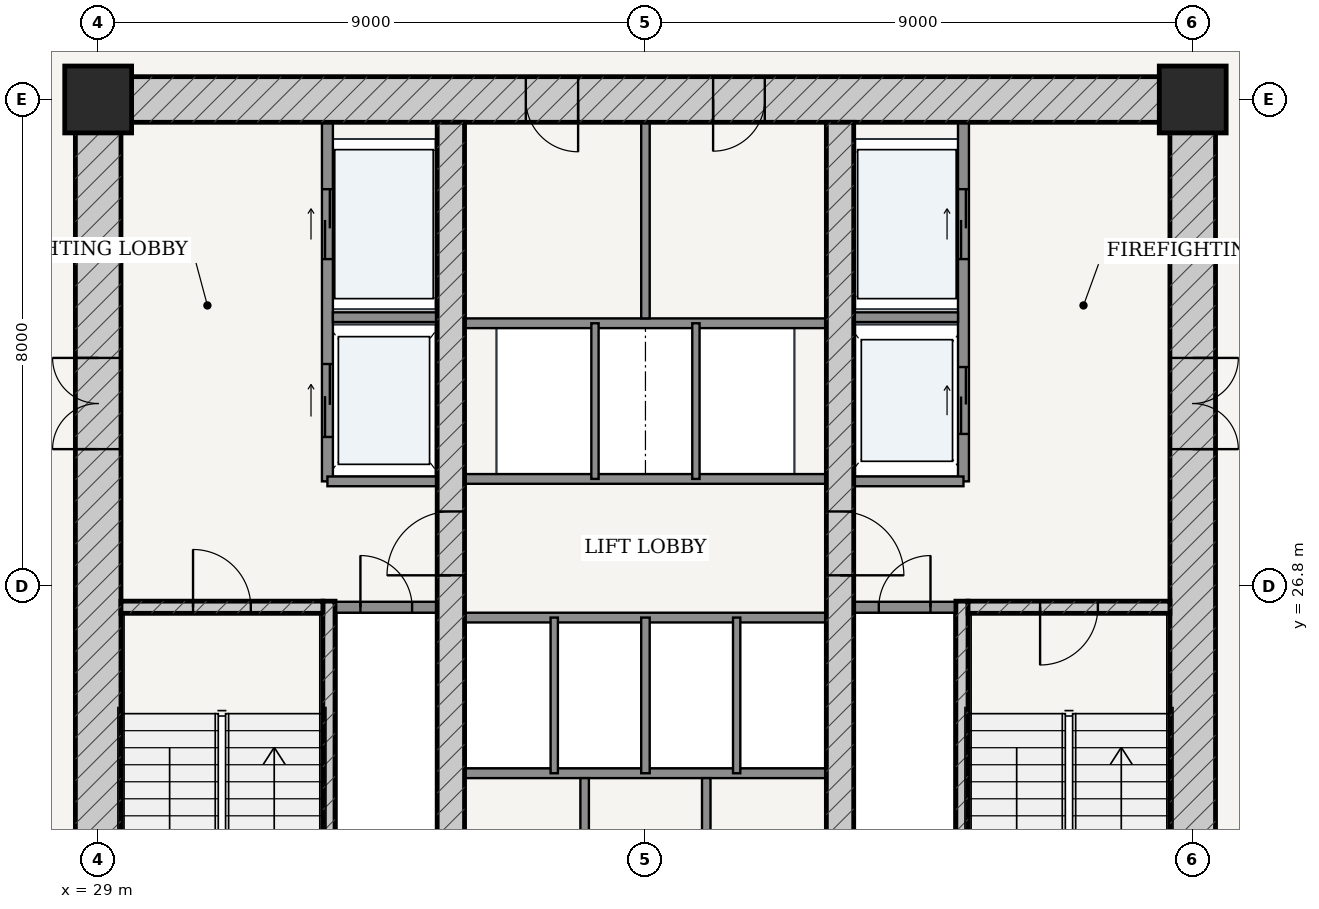
"""IFC4 building model, lengths in metres.
Left out: names, types, materials, properties, quantities, classifications, styles, units other than length and angle.
Written with IfcOpenShell. Run it as: python <this file> out.ifc"""

import sys

from ifc_helpers import new_model, si_unit, direction, frame, frame_2d, origin, origin_2d, place, context, subcontext, project, spatial, rectangle, extrude, source, transform, mapped, element, fill, save


model = new_model("IFC4")
c1 = context("Model", 3, precision=1e-05, world=origin(), true_north=direction((-0.2419218956, 0.970295726276)))
c2 = subcontext(c1, "Body", "Model", "MODEL_VIEW")
j1 = project(units=[si_unit("LENGTHUNIT", "METRE"), si_unit("PLANEANGLEUNIT", "RADIAN")], contexts=[c1])
p1 = place(None, origin())
s1 = spatial("IfcSite", under=j1, at=p1, CompositionType="ELEMENT")
p2 = place(p1, origin())
s2 = spatial("IfcBuilding", under=s1, at=p2, CompositionType="ELEMENT")
p3 = place(p2, frame((0.0, 0.0, -4.2)))
s3 = spatial("IfcBuildingStorey", under=s2, at=p3, CompositionType="ELEMENT", Elevation=-4.2)
for number, where, z_axis, x_axis in (
    (1, (47.0, 34.8, 0.0), (0.0, 0.0, 1.0), (1.0, 0.0, 0.0)),
    (2, (29.0, 34.8, 0.0), (0.0, 0.0, 1.0), (1.0, 0.0, 0.0)),
):
    element("IfcColumn", number, at=place(p3, frame(where, z_axis=z_axis, x_axis=x_axis)), inside=s3, PredefinedType="COLUMN", context=c2, shape_type="SweptSolid", body=[
        extrude(rectangle(XDim=1.1, YDim=1.1, at=origin_2d()), origin(), (0.0, 0.0, 1.0), 4.2),
    ])
p4 = place(p3, frame((28.625, 34.8, 0.0), z_axis=(0.0, 0.0, 1.0), x_axis=(1.0, 0.0, 0.0)))
e3 = element("IfcWall", 3, at=p4, inside=s3, PredefinedType="SHEAR", context=c2, shape_type="SweptSolid", body=[
    extrude(rectangle(XDim=18.75, YDim=0.75, at=frame_2d((9.375, 0.0))), origin(), (0.0, 0.0, 1.0), 3.78),
])
p5 = place(p4, frame((7.407, 0.0, 0.0)))
e4 = element("IfcOpeningElement", 4, at=p5, cuts=e3, PredefinedType="OPENING", context=c2, shape_type="SweptSolid", body=[
    extrude(rectangle(XDim=0.86, YDim=2.1, at=frame_2d((0.43, 1.05))), frame((0.0, 0.385, 0.0), z_axis=(0.0, -1.0, 0.0), x_axis=(1.0, 0.0, 0.0)), (0.0, 0.0, 1.0), 0.77),
])
p6 = place(p4, frame((10.488, 0.0, 0.0)))
e5 = element("IfcOpeningElement", 5, at=p6, cuts=e3, PredefinedType="OPENING", context=c2, shape_type="SweptSolid", body=[
    extrude(rectangle(XDim=0.85, YDim=2.1, at=frame_2d((0.425, 1.05))), frame((0.0, 0.385, 0.0), z_axis=(0.0, -1.0, 0.0), x_axis=(1.0, 0.0, 0.0)), (0.0, 0.0, 1.0), 0.77),
])
p7 = place(p3, frame((29.0, 19.175, 0.0), z_axis=(0.0, 0.0, 1.0), x_axis=(0.0, 1.0, 0.0)))
e6 = element("IfcWall", 6, at=p7, inside=s3, PredefinedType="SHEAR", context=c2, shape_type="SweptSolid", body=[
    extrude(rectangle(XDim=15.25, YDim=0.75, at=frame_2d((7.625, 0.0))), origin(), (0.0, 0.0, 1.0), 3.78),
])
p8 = place(p7, frame((9.875, 0.0, 0.0)))
e7 = element("IfcOpeningElement", 7, at=p8, cuts=e6, PredefinedType="OPENING", context=c2, shape_type="SweptSolid", body=[
    extrude(rectangle(XDim=1.5, YDim=2.2, at=frame_2d((0.75, 1.1))), frame((0.0, 0.385, 0.0), z_axis=(0.0, -1.0, 0.0), x_axis=(1.0, 0.0, 0.0)), (0.0, 0.0, 1.0), 0.77),
])
p9 = place(p3, frame((47.0, 19.175, 0.0), z_axis=(0.0, 0.0, 1.0), x_axis=(0.0, 1.0, 0.0)))
e8 = element("IfcWall", 8, at=p9, inside=s3, PredefinedType="SHEAR", context=c2, shape_type="SweptSolid", body=[
    extrude(rectangle(XDim=15.25, YDim=0.75, at=frame_2d((7.625, 0.0))), origin(), (0.0, 0.0, 1.0), 3.78),
])
p10 = place(p9, frame((9.875, 0.0, 0.0)))
e9 = element("IfcOpeningElement", 9, at=p10, cuts=e8, PredefinedType="OPENING", context=c2, shape_type="SweptSolid", body=[
    extrude(rectangle(XDim=1.5, YDim=2.2, at=frame_2d((0.75, 1.1))), frame((0.0, 0.385, 0.0), z_axis=(0.0, -1.0, 0.0), x_axis=(1.0, 0.0, 0.0)), (0.0, 0.0, 1.0), 0.77),
])
p11 = place(p3, frame((32.795, 19.175, 0.0), z_axis=(0.0, 0.0, 1.0), x_axis=(0.0, 1.0, 0.0)))
e10 = element("IfcWall", 10, at=p11, inside=s3, PredefinedType="SOLIDWALL", context=c2, shape_type="SweptSolid", body=[
    extrude(rectangle(XDim=7.375, YDim=0.2, at=frame_2d((3.688, 0.0))), origin(), (0.0, 0.0, 1.0), 3.78),
])
p12 = place(p3, frame((29.375, 26.45, 0.0), z_axis=(0.0, 0.0, 1.0), x_axis=(1.0, 0.0, 0.0)))
e11 = element("IfcWall", 11, at=p12, inside=s3, PredefinedType="SOLIDWALL", context=c2, shape_type="SweptSolid", body=[
    extrude(rectangle(XDim=3.32, YDim=0.2, at=frame_2d((1.66, 0.0))), origin(), (0.0, 0.0, 1.0), 3.78),
])
p13 = place(p12, frame((1.185, 0.0, 0.0)))
e12 = element("IfcOpeningElement", 12, at=p13, cuts=e11, PredefinedType="OPENING", context=c2, shape_type="SweptSolid", body=[
    extrude(rectangle(XDim=0.95, YDim=2.15, at=frame_2d((0.475, 1.075))), frame((0.0, 0.11, 0.0), z_axis=(0.0, -1.0, 0.0), x_axis=(1.0, 0.0, 0.0)), (0.0, 0.0, 1.0), 0.22),
])
p14 = place(p3, frame((43.205, 19.175, 0.0), z_axis=(0.0, 0.0, 1.0), x_axis=(0.0, 1.0, 0.0)))
e13 = element("IfcWall", 13, at=p14, inside=s3, PredefinedType="SOLIDWALL", context=c2, shape_type="SweptSolid", body=[
    extrude(rectangle(XDim=7.375, YDim=0.2, at=frame_2d((3.688, 0.0))), origin(), (0.0, 0.0, 1.0), 3.78),
])
p15 = place(p3, frame((43.305, 26.45, 0.0), z_axis=(0.0, 0.0, 1.0), x_axis=(1.0, 0.0, 0.0)))
e14 = element("IfcWall", 14, at=p15, inside=s3, PredefinedType="SOLIDWALL", context=c2, shape_type="SweptSolid", body=[
    extrude(rectangle(XDim=3.32, YDim=0.2, at=frame_2d((1.66, 0.0))), origin(), (0.0, 0.0, 1.0), 3.78),
])
p16 = place(p15, frame((1.185, 0.0, 0.0)))
e15 = element("IfcOpeningElement", 15, at=p16, cuts=e14, PredefinedType="OPENING", context=c2, shape_type="SweptSolid", body=[
    extrude(rectangle(XDim=0.95, YDim=2.15, at=frame_2d((0.475, 1.075))), frame((0.0, 0.11, 0.0), z_axis=(0.0, -1.0, 0.0), x_axis=(1.0, 0.0, 0.0)), (0.0, 0.0, 1.0), 0.22),
])
p17 = place(p3, frame((34.8, 19.175, 0.0), z_axis=(0.0, 0.0, 1.0), x_axis=(0.0, 1.0, 0.0)))
e16 = element("IfcWall", 16, at=p17, inside=s3, PredefinedType="SHEAR", context=c2, shape_type="SweptSolid", body=[
    extrude(rectangle(XDim=15.25, YDim=0.45, at=frame_2d((7.625, 0.0))), origin(), (0.0, 0.0, 1.0), 3.78),
])
p18 = place(p17, frame((7.8, 0.0, 0.0)))
e17 = element("IfcOpeningElement", 17, at=p18, cuts=e16, PredefinedType="OPENING", context=c2, shape_type="SweptSolid", body=[
    extrude(rectangle(XDim=1.05, YDim=2.15, at=frame_2d((0.525, 1.075))), frame((0.0, 0.235, 0.0), z_axis=(0.0, -1.0, 0.0), x_axis=(1.0, 0.0, 0.0)), (0.0, 0.0, 1.0), 0.47),
])
p19 = place(p3, frame((41.2, 19.175, 0.0), z_axis=(0.0, 0.0, 1.0), x_axis=(0.0, 1.0, 0.0)))
e18 = element("IfcWall", 18, at=p19, inside=s3, PredefinedType="SHEAR", context=c2, shape_type="SweptSolid", body=[
    extrude(rectangle(XDim=15.25, YDim=0.45, at=frame_2d((7.625, 0.0))), origin(), (0.0, 0.0, 1.0), 3.78),
])
p20 = place(p19, frame((7.8, 0.0, 0.0)))
e19 = element("IfcOpeningElement", 19, at=p20, cuts=e18, PredefinedType="OPENING", context=c2, shape_type="SweptSolid", body=[
    extrude(rectangle(XDim=1.05, YDim=2.15, at=frame_2d((0.525, 1.075))), frame((0.0, 0.235, 0.0), z_axis=(0.0, -1.0, 0.0), x_axis=(1.0, 0.0, 0.0)), (0.0, 0.0, 1.0), 0.47),
])
p21 = place(p3, frame((32.9, 26.45, 0.0), z_axis=(0.0, 0.0, 1.0), x_axis=(1.0, 0.0, 0.0)))
e20 = element("IfcWall", 20, at=p21, inside=s3, PredefinedType="PARTITIONING", context=c2, shape_type="SweptSolid", body=[
    extrude(rectangle(XDim=1.675, YDim=0.18, at=frame_2d((0.837, 0.0))), origin(), (0.0, 0.0, 1.0), 3.78),
])
p22 = place(p21, frame((0.413, 0.0, 0.0)))
e21 = element("IfcOpeningElement", 21, at=p22, cuts=e20, PredefinedType="OPENING", context=c2, shape_type="SweptSolid", body=[
    extrude(rectangle(XDim=0.85, YDim=2.1, at=frame_2d((0.425, 1.05))), frame((0.0, 0.1, 0.0), z_axis=(0.0, -1.0, 0.0), x_axis=(1.0, 0.0, 0.0)), (0.0, 0.0, 1.0), 0.2),
])
p23 = place(p3, frame((41.425, 26.45, 0.0), z_axis=(0.0, 0.0, 1.0), x_axis=(1.0, 0.0, 0.0)))
e22 = element("IfcWall", 22, at=p23, inside=s3, PredefinedType="PARTITIONING", context=c2, shape_type="SweptSolid", body=[
    extrude(rectangle(XDim=1.675, YDim=0.18, at=frame_2d((0.837, 0.0))), origin(), (0.0, 0.0, 1.0), 3.78),
])
p24 = place(p23, frame((0.413, 0.0, 0.0)))
e23 = element("IfcOpeningElement", 23, at=p24, cuts=e22, PredefinedType="OPENING", context=c2, shape_type="SweptSolid", body=[
    extrude(rectangle(XDim=0.85, YDim=2.1, at=frame_2d((0.425, 1.05))), frame((0.0, 0.1, 0.0), z_axis=(0.0, -1.0, 0.0), x_axis=(1.0, 0.0, 0.0)), (0.0, 0.0, 1.0), 0.2),
])
p25 = place(p3, frame((32.77, 28.52, 0.0), z_axis=(0.0, 0.0, 1.0), x_axis=(0.0, 1.0, 0.0)))
e24 = element("IfcWall", 24, at=p25, inside=s3, PredefinedType="PARTITIONING", context=c2, shape_type="SweptSolid", body=[
    extrude(rectangle(XDim=5.905, YDim=0.18, at=frame_2d((2.953, 0.0))), origin(), (0.0, 0.0, 1.0), 3.78),
])
p26 = place(p25, frame((3.655, 0.0, 0.0)))
e25 = element("IfcOpeningElement", 25, at=p26, cuts=e24, PredefinedType="OPENING", context=c2, shape_type="SweptSolid", body=[
    extrude(rectangle(XDim=1.15, YDim=2.2, at=frame_2d((0.575, 1.1))), frame((0.0, 0.1, 0.0), z_axis=(0.0, -1.0, 0.0), x_axis=(1.0, 0.0, 0.0)), (0.0, 0.0, 1.0), 0.2),
])
p27 = place(p25, frame((0.73, 0.0, 0.0)))
e26 = element("IfcOpeningElement", 26, at=p27, cuts=e24, PredefinedType="OPENING", context=c2, shape_type="SweptSolid", body=[
    extrude(rectangle(XDim=1.2, YDim=2.25, at=frame_2d((0.6, 1.125))), frame((0.0, 0.1, 0.0), z_axis=(0.0, -1.0, 0.0), x_axis=(1.0, 0.0, 0.0)), (0.0, 0.0, 1.0), 0.2),
])
p28 = place(p3, frame((32.86, 31.22, 0.0), z_axis=(0.0, 0.0, 1.0), x_axis=(1.0, 0.0, 0.0)))
e27 = element("IfcWall", 27, at=p28, inside=s3, PredefinedType="PARTITIONING", context=c2, shape_type="SweptSolid", body=[
    extrude(rectangle(XDim=1.715, YDim=0.16, at=frame_2d((0.857, 0.0))), origin(), (0.0, 0.0, 1.0), 3.78),
])
p29 = place(p3, frame((32.77, 28.52, 0.0), z_axis=(0.0, 0.0, 1.0), x_axis=(1.0, 0.0, 0.0)))
e28 = element("IfcWall", 28, at=p29, inside=s3, PredefinedType="PARTITIONING", context=c2, shape_type="SweptSolid", body=[
    extrude(rectangle(XDim=1.805, YDim=0.16, at=frame_2d((0.902, 0.0))), origin(), (0.0, 0.0, 1.0), 3.78),
])
p30 = place(p3, frame((43.23, 28.52, 0.0), z_axis=(0.0, 0.0, 1.0), x_axis=(0.0, 1.0, 0.0)))
e29 = element("IfcWall", 29, at=p30, inside=s3, PredefinedType="PARTITIONING", context=c2, shape_type="SweptSolid", body=[
    extrude(rectangle(XDim=5.905, YDim=0.18, at=frame_2d((2.953, 0.0))), origin(), (0.0, 0.0, 1.0), 3.78),
])
p31 = place(p30, frame((3.655, 0.0, 0.0)))
e30 = element("IfcOpeningElement", 30, at=p31, cuts=e29, PredefinedType="OPENING", context=c2, shape_type="SweptSolid", body=[
    extrude(rectangle(XDim=1.15, YDim=2.2, at=frame_2d((0.575, 1.1))), frame((0.0, 0.1, 0.0), z_axis=(0.0, -1.0, 0.0), x_axis=(1.0, 0.0, 0.0)), (0.0, 0.0, 1.0), 0.2),
])
p32 = place(p30, frame((0.78, 0.0, 0.0)))
e31 = element("IfcOpeningElement", 31, at=p32, cuts=e29, PredefinedType="OPENING", context=c2, shape_type="SweptSolid", body=[
    extrude(rectangle(XDim=1.1, YDim=2.2, at=frame_2d((0.55, 1.1))), frame((0.0, 0.1, 0.0), z_axis=(0.0, -1.0, 0.0), x_axis=(1.0, 0.0, 0.0)), (0.0, 0.0, 1.0), 0.2),
])
p33 = place(p3, frame((41.425, 31.22, 0.0), z_axis=(0.0, 0.0, 1.0), x_axis=(1.0, 0.0, 0.0)))
e32 = element("IfcWall", 32, at=p33, inside=s3, PredefinedType="PARTITIONING", context=c2, shape_type="SweptSolid", body=[
    extrude(rectangle(XDim=1.715, YDim=0.16, at=frame_2d((0.857, 0.0))), origin(), (0.0, 0.0, 1.0), 3.78),
])
p34 = place(p3, frame((41.425, 28.52, 0.0), z_axis=(0.0, 0.0, 1.0), x_axis=(1.0, 0.0, 0.0)))
e33 = element("IfcWall", 33, at=p34, inside=s3, PredefinedType="PARTITIONING", context=c2, shape_type="SweptSolid", body=[
    extrude(rectangle(XDim=1.805, YDim=0.16, at=frame_2d((0.902, 0.0))), origin(), (0.0, 0.0, 1.0), 3.78),
])
for number, where, z_axis, x_axis in (
    (34, (35.025, 28.56, 0.0), (0.0, 0.0, 1.0), (1.0, 0.0, 0.0)),
    (35, (35.025, 31.12, 0.0), (0.0, 0.0, 1.0), (1.0, 0.0, 0.0)),
):
    element("IfcWall", number, at=place(p3, frame(where, z_axis=z_axis, x_axis=x_axis)), inside=s3, PredefinedType="PARTITIONING", context=c2, shape_type="SweptSolid", body=[
        extrude(rectangle(XDim=5.95, YDim=0.16, at=frame_2d((2.975, 0.0))), origin(), (0.0, 0.0, 1.0), 3.78),
    ])
for number, where, z_axis, x_axis in (
    (36, (37.17, 28.56, 0.0), (0.0, 0.0, 1.0), (0.0, 1.0, 0.0)),
    (37, (38.83, 28.56, 0.0), (0.0, 0.0, 1.0), (0.0, 1.0, 0.0)),
):
    element("IfcWall", number, at=place(p3, frame(where, z_axis=z_axis, x_axis=x_axis)), inside=s3, PredefinedType="PARTITIONING", context=c2, shape_type="SweptSolid", body=[
        extrude(rectangle(XDim=2.56, YDim=0.12, at=frame_2d((1.28, 0.0))), origin(), (0.0, 0.0, 1.0), 3.78),
    ])
p35 = place(p3, frame((38.0, 31.2, 0.0), z_axis=(0.0, 0.0, 1.0), x_axis=(0.0, 1.0, 0.0)))
e38 = element("IfcWall", 38, at=p35, inside=s3, PredefinedType="PARTITIONING", context=c2, shape_type="SweptSolid", body=[
    extrude(rectangle(XDim=3.225, YDim=0.14, at=frame_2d((1.613, 0.0))), origin(), (0.0, 0.0, 1.0), 3.78),
])
for number, where, z_axis, x_axis in (
    (39, (35.025, 26.28, 0.0), (0.0, 0.0, 1.0), (1.0, 0.0, 0.0)),
    (40, (35.025, 23.72, 0.0), (0.0, 0.0, 1.0), (1.0, 0.0, 0.0)),
):
    element("IfcWall", number, at=place(p3, frame(where, z_axis=z_axis, x_axis=x_axis)), inside=s3, PredefinedType="PARTITIONING", context=c2, shape_type="SweptSolid", body=[
        extrude(rectangle(XDim=5.95, YDim=0.16, at=frame_2d((2.975, 0.0))), origin(), (0.0, 0.0, 1.0), 3.78),
    ])
p36 = place(p3, frame((36.5, 23.72, 0.0), z_axis=(0.0, 0.0, 1.0), x_axis=(0.0, 1.0, 0.0)))
e41 = element("IfcWall", 41, at=p36, inside=s3, PredefinedType="PARTITIONING", context=c2, shape_type="SweptSolid", body=[
    extrude(rectangle(XDim=2.56, YDim=0.12, at=frame_2d((1.28, 0.0))), origin(), (0.0, 0.0, 1.0), 3.78),
])
p37 = place(p3, frame((38.0, 23.72, 0.0), z_axis=(0.0, 0.0, 1.0), x_axis=(0.0, 1.0, 0.0)))
e42 = element("IfcWall", 42, at=p37, inside=s3, PredefinedType="PARTITIONING", context=c2, shape_type="SweptSolid", body=[
    extrude(rectangle(XDim=2.56, YDim=0.14, at=frame_2d((1.28, 0.0))), origin(), (0.0, 0.0, 1.0), 3.78),
])
p38 = place(p3, frame((39.5, 23.72, 0.0), z_axis=(0.0, 0.0, 1.0), x_axis=(0.0, 1.0, 0.0)))
e43 = element("IfcWall", 43, at=p38, inside=s3, PredefinedType="PARTITIONING", context=c2, shape_type="SweptSolid", body=[
    extrude(rectangle(XDim=2.56, YDim=0.12, at=frame_2d((1.28, 0.0))), origin(), (0.0, 0.0, 1.0), 3.78),
])
p39 = place(p3, frame((37.0, 19.175, 0.0), z_axis=(0.0, 0.0, 1.0), x_axis=(0.0, 1.0, 0.0)))
e44 = element("IfcWall", 44, at=p39, inside=s3, PredefinedType="PARTITIONING", context=c2, shape_type="SweptSolid", body=[
    extrude(rectangle(XDim=4.465, YDim=0.14, at=frame_2d((2.232, 0.0))), origin(), (0.0, 0.0, 1.0), 3.78),
])
p40 = place(p39, frame((1.808, 0.0, 0.0)))
e45 = element("IfcOpeningElement", 45, at=p40, cuts=e44, PredefinedType="OPENING", context=c2, shape_type="SweptSolid", body=[
    extrude(rectangle(XDim=0.85, YDim=2.1, at=frame_2d((0.425, 1.05))), frame((0.0, 0.08, 0.0), z_axis=(0.0, -1.0, 0.0), x_axis=(1.0, 0.0, 0.0)), (0.0, 0.0, 1.0), 0.16),
])
p41 = place(p3, frame((39.0, 19.175, 0.0), z_axis=(0.0, 0.0, 1.0), x_axis=(0.0, 1.0, 0.0)))
e46 = element("IfcWall", 46, at=p41, inside=s3, PredefinedType="PARTITIONING", context=c2, shape_type="SweptSolid", body=[
    extrude(rectangle(XDim=4.465, YDim=0.14, at=frame_2d((2.232, 0.0))), origin(), (0.0, 0.0, 1.0), 3.78),
])
p42 = place(p41, frame((1.808, 0.0, 0.0)))
e47 = element("IfcOpeningElement", 47, at=p42, cuts=e46, PredefinedType="OPENING", context=c2, shape_type="SweptSolid", body=[
    extrude(rectangle(XDim=0.85, YDim=2.1, at=frame_2d((0.425, 1.05))), frame((0.0, 0.08, 0.0), z_axis=(0.0, -1.0, 0.0), x_axis=(1.0, 0.0, 0.0)), (0.0, 0.0, 1.0), 0.16),
])
m1 = source(origin(), c2, "Body", "SweptSolid", [
    extrude(rectangle(XDim=1.5, YDim=2.2, at=frame_2d((0.75, 1.1))), frame((0.0, 0.025, 0.0), z_axis=(0.0, -1.0, 0.0), x_axis=(1.0, 0.0, 0.0)), (0.0, 0.0, 1.0), 0.05),
])
p43 = place(p8, origin())
e48 = element("IfcDoor", 48, at=p43, inside=s3, OperationType="DOUBLE_DOOR_SINGLE_SWING", PredefinedType="DOOR", context=c2, shape_type="MappedRepresentation", body=[
    mapped(m1, transform((0.0, 0.0, 0.0), scale=1.0)),
])
fill(e7, e48)
p44 = place(p10, frame((1.5, 0.0, 0.0), z_axis=(0.0, 0.0, 1.0), x_axis=(-1.0, 0.0, 0.0)))
e49 = element("IfcDoor", 49, at=p44, inside=s3, OperationType="DOUBLE_DOOR_SINGLE_SWING", PredefinedType="DOOR", context=c2, shape_type="MappedRepresentation", body=[
    mapped(m1, transform((0.0, 0.0, 0.0), scale=1.0)),
])
fill(e9, e49)
m2 = source(origin(), c2, "Body", "SweptSolid", [
    extrude(rectangle(XDim=1.05, YDim=2.15, at=frame_2d((0.525, 1.075))), frame((0.0, 0.025, 0.0), z_axis=(0.0, -1.0, 0.0), x_axis=(1.0, 0.0, 0.0)), (0.0, 0.0, 1.0), 0.05),
])
p45 = place(p18, origin())
e50 = element("IfcDoor", 50, at=p45, inside=s3, OperationType="SINGLE_SWING_LEFT", PredefinedType="DOOR", context=c2, shape_type="MappedRepresentation", body=[
    mapped(m2, transform((0.0, 0.0, 0.0), scale=1.0)),
])
fill(e17, e50)
p46 = place(p20, frame((1.05, 0.0, 0.0), z_axis=(0.0, 0.0, 1.0), x_axis=(-1.0, 0.0, 0.0)))
e51 = element("IfcDoor", 51, at=p46, inside=s3, OperationType="SINGLE_SWING_RIGHT", PredefinedType="DOOR", context=c2, shape_type="MappedRepresentation", body=[
    mapped(m2, transform((0.0, 0.0, 0.0), scale=1.0)),
])
fill(e19, e51)
m3 = source(origin(), c2, "Body", "SweptSolid", [
    extrude(rectangle(XDim=0.95, YDim=2.15, at=frame_2d((0.475, 1.075))), frame((0.0, 0.025, 0.0), z_axis=(0.0, -1.0, 0.0), x_axis=(1.0, 0.0, 0.0)), (0.0, 0.0, 1.0), 0.05),
])
p47 = place(p13, origin())
e52 = element("IfcDoor", 52, at=p47, inside=s3, OperationType="SINGLE_SWING_LEFT", PredefinedType="DOOR", context=c2, shape_type="MappedRepresentation", body=[
    mapped(m3, transform((0.0, 0.0, 0.0), scale=1.0)),
])
fill(e12, e52)
p48 = place(p16, frame((0.95, 0.0, 0.0), z_axis=(0.0, 0.0, 1.0), x_axis=(-1.0, 0.0, 0.0)))
e53 = element("IfcDoor", 53, at=p48, inside=s3, OperationType="SINGLE_SWING_RIGHT", PredefinedType="DOOR", context=c2, shape_type="MappedRepresentation", body=[
    mapped(m3, transform((0.0, 0.0, 0.0), scale=1.0)),
])
fill(e15, e53)
m4 = source(origin(), c2, "Body", "SweptSolid", [
    extrude(rectangle(XDim=0.85, YDim=2.1, at=frame_2d((0.425, 1.05))), frame((0.0, 0.025, 0.0), z_axis=(0.0, -1.0, 0.0), x_axis=(1.0, 0.0, 0.0)), (0.0, 0.0, 1.0), 0.05),
])
p49 = place(p22, origin())
e54 = element("IfcDoor", 54, at=p49, inside=s3, OperationType="SINGLE_SWING_LEFT", PredefinedType="DOOR", context=c2, shape_type="MappedRepresentation", body=[
    mapped(m4, transform((0.0, 0.0, 0.0), scale=1.0)),
])
fill(e21, e54)
p50 = place(p24, origin())
e55 = element("IfcDoor", 55, at=p50, inside=s3, OperationType="SINGLE_SWING_RIGHT", PredefinedType="DOOR", context=c2, shape_type="MappedRepresentation", body=[
    mapped(m4, transform((0.0, 0.0, 0.0), scale=1.0)),
])
fill(e23, e55)
m5 = source(origin(), c2, "Body", "SweptSolid", [
    extrude(rectangle(XDim=0.86, YDim=2.1, at=frame_2d((0.43, 1.05))), frame((0.0, 0.025, 0.0), z_axis=(0.0, -1.0, 0.0), x_axis=(1.0, 0.0, 0.0)), (0.0, 0.0, 1.0), 0.05),
])
p51 = place(p5, frame((0.86, 0.0, 0.0), z_axis=(0.0, 0.0, 1.0), x_axis=(-1.0, 0.0, 0.0)))
e56 = element("IfcDoor", 56, at=p51, inside=s3, OperationType="SINGLE_SWING_LEFT", PredefinedType="DOOR", context=c2, shape_type="MappedRepresentation", body=[
    mapped(m5, transform((0.0, 0.0, 0.0), scale=1.0)),
])
fill(e4, e56)
p52 = place(p6, frame((0.85, 0.0, 0.0), z_axis=(0.0, 0.0, 1.0), x_axis=(-1.0, 0.0, 0.0)))
e57 = element("IfcDoor", 57, at=p52, inside=s3, OperationType="SINGLE_SWING_RIGHT", PredefinedType="DOOR", context=c2, shape_type="MappedRepresentation", body=[
    mapped(m4, transform((0.0, 0.0, 0.0), scale=1.0)),
])
fill(e5, e57)
m6 = source(origin(), c2, "Body", "SweptSolid", [
    extrude(rectangle(XDim=1.15, YDim=2.2, at=frame_2d((0.575, 1.1))), frame((0.0, 0.025, 0.0), z_axis=(0.0, -1.0, 0.0), x_axis=(1.0, 0.0, 0.0)), (0.0, 0.0, 1.0), 0.05),
])
p53 = place(p26, origin())
e58 = element("IfcDoor", 58, at=p53, inside=s3, OperationType="DOUBLE_DOOR_SLIDING", PredefinedType="DOOR", context=c2, shape_type="MappedRepresentation", body=[
    mapped(m6, transform((0.0, 0.0, 0.0), scale=1.0)),
])
fill(e25, e58)
p54 = place(p31, origin())
e59 = element("IfcDoor", 59, at=p54, inside=s3, OperationType="DOUBLE_DOOR_SLIDING", PredefinedType="DOOR", context=c2, shape_type="MappedRepresentation", body=[
    mapped(m6, transform((0.0, 0.0, 0.0), scale=1.0)),
])
fill(e30, e59)
m7 = source(origin(), c2, "Body", "SweptSolid", [
    extrude(rectangle(XDim=1.2, YDim=2.25, at=frame_2d((0.6, 1.125))), frame((0.0, 0.025, 0.0), z_axis=(0.0, -1.0, 0.0), x_axis=(1.0, 0.0, 0.0)), (0.0, 0.0, 1.0), 0.05),
])
p55 = place(p27, origin())
e60 = element("IfcDoor", 60, at=p55, inside=s3, OperationType="DOUBLE_DOOR_SLIDING", PredefinedType="DOOR", context=c2, shape_type="MappedRepresentation", body=[
    mapped(m7, transform((0.0, 0.0, 0.0), scale=1.0)),
])
fill(e26, e60)
m8 = source(origin(), c2, "Body", "SweptSolid", [
    extrude(rectangle(XDim=1.1, YDim=2.2, at=frame_2d((0.55, 1.1))), frame((0.0, 0.025, 0.0), z_axis=(0.0, -1.0, 0.0), x_axis=(1.0, 0.0, 0.0)), (0.0, 0.0, 1.0), 0.05),
])
p56 = place(p32, origin())
e61 = element("IfcDoor", 61, at=p56, inside=s3, OperationType="DOUBLE_DOOR_SLIDING", PredefinedType="DOOR", context=c2, shape_type="MappedRepresentation", body=[
    mapped(m8, transform((0.0, 0.0, 0.0), scale=1.0)),
])
fill(e31, e61)
save(model, sys.argv[1])
